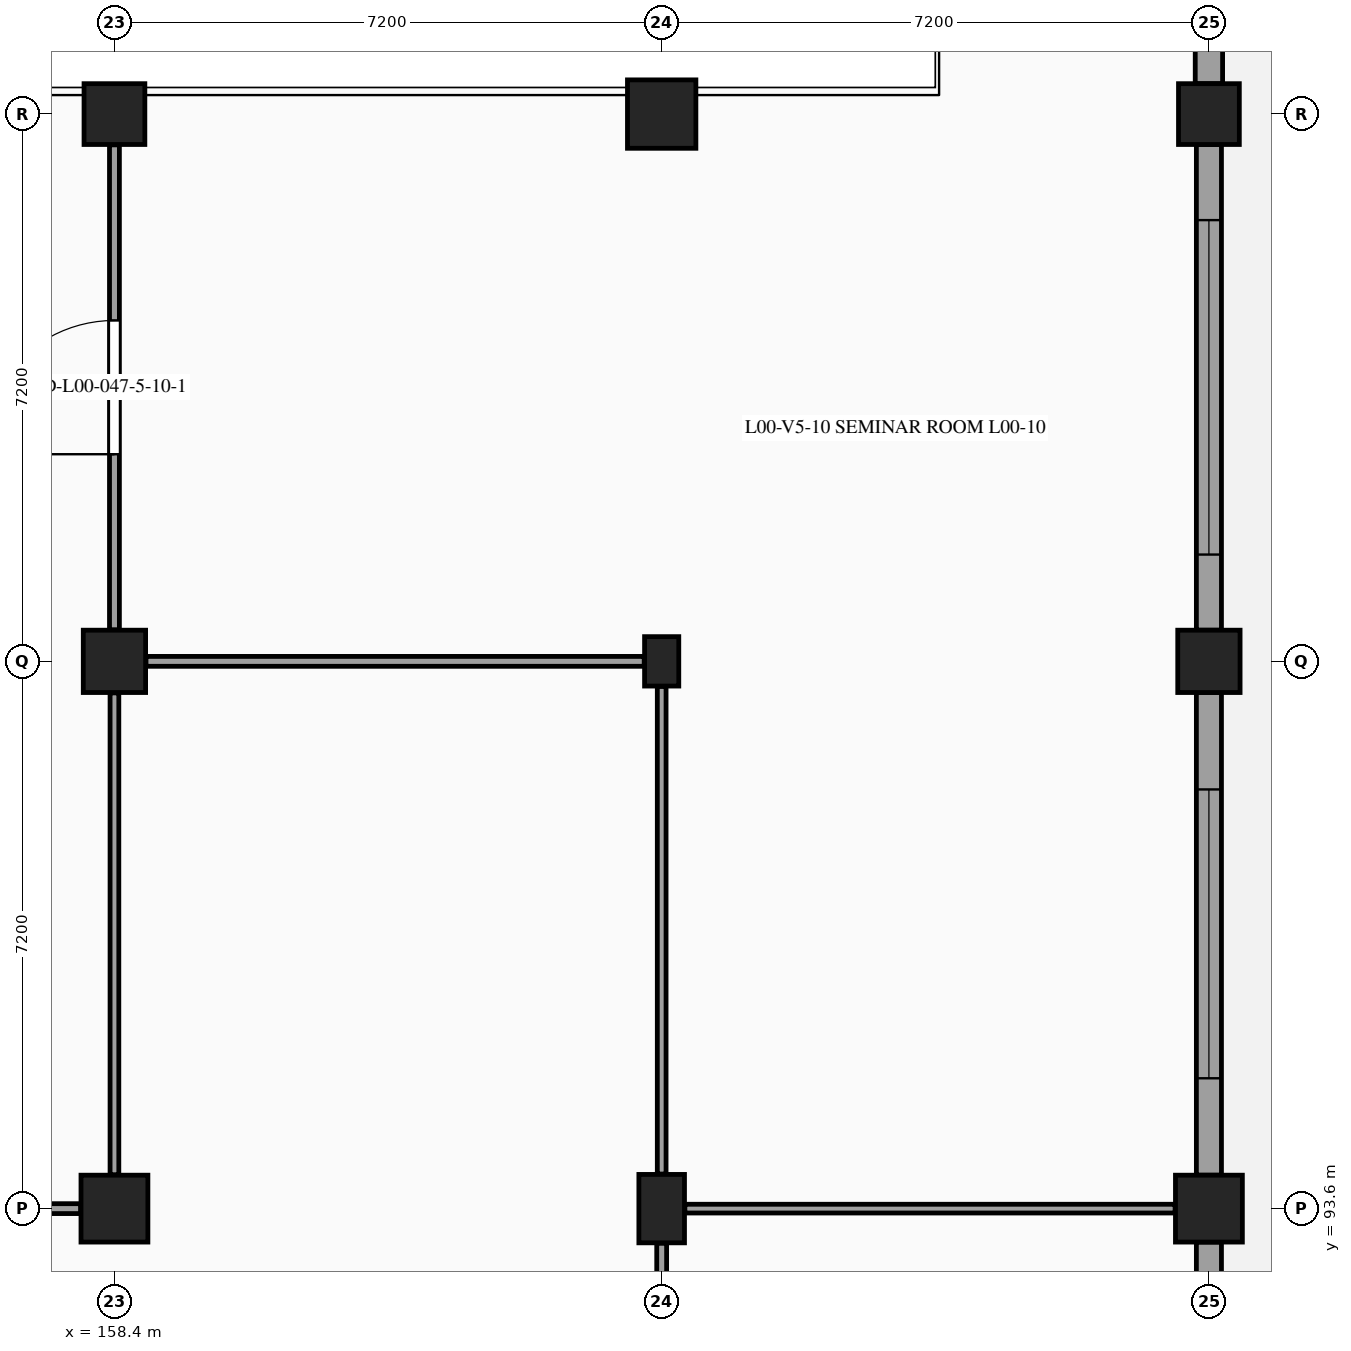
"""IFC4 building model, lengths in metres.
Left out: names, types, materials, properties, quantities, classifications, styles, units other than length and angle.
Written with IfcOpenShell. Run it as: python <this file> out.ifc"""

import sys

from ifc_helpers import new_model, si_unit, direction, frame, frame_2d, origin, origin_2d, place, context, subcontext, project, spatial, rectangle, extrude, element, fill, save


model = new_model("IFC4")
c1 = context("Model", 3, precision=1e-05, world=origin(), true_north=direction((0.0, 1.0)))
c2 = subcontext(c1, "Body", "Model", "MODEL_VIEW")
j1 = project(units=[si_unit("LENGTHUNIT", "METRE"), si_unit("PLANEANGLEUNIT", "RADIAN")], contexts=[c1])
p1 = place(None, origin())
s1 = spatial("IfcSite", under=j1, at=p1, CompositionType="ELEMENT")
p2 = place(p1, origin())
s2 = spatial("IfcBuilding", under=s1, at=p2, CompositionType="ELEMENT")
p3 = place(p2, origin())
s3 = spatial("IfcBuildingStorey", under=s2, at=p3, CompositionType="ELEMENT", Elevation=0.0)
p4 = place(p3, frame((158.4, 93.6, 0.0), z_axis=(0.0, 0.0, 1.0), x_axis=(1.0, 0.0, 0.0)))
e1 = element("IfcColumn", 1, at=p4, inside=s3, PredefinedType="COLUMN", context=c2, shape_type="SweptSolid", body=[
    extrude(rectangle(XDim=0.88, YDim=0.88, at=origin_2d()), origin(), (0.0, 0.0, 1.0), 5.4),
])
p5 = place(p3, frame((158.4, 100.8, 0.0), z_axis=(0.0, 0.0, 1.0), x_axis=(1.0, 0.0, 0.0)))
e2 = element("IfcColumn", 2, at=p5, inside=s3, PredefinedType="COLUMN", context=c2, shape_type="SweptSolid", body=[
    extrude(rectangle(XDim=0.82, YDim=0.82, at=origin_2d()), origin(), (0.0, 0.0, 1.0), 5.4),
])
p6 = place(p3, frame((158.4, 108.0, 0.0), z_axis=(0.0, 0.0, 1.0), x_axis=(1.0, 0.0, 0.0)))
e3 = element("IfcColumn", 3, at=p6, inside=s3, PredefinedType="COLUMN", context=c2, shape_type="SweptSolid", body=[
    extrude(rectangle(XDim=0.8, YDim=0.8, at=origin_2d()), origin(), (0.0, 0.0, 1.0), 5.4),
])
p7 = place(p3, frame((165.6, 93.6, 0.0), z_axis=(0.0, 0.0, 1.0), x_axis=(1.0, 0.0, 0.0)))
e4 = element("IfcColumn", 4, at=p7, inside=s3, PredefinedType="COLUMN", context=c2, shape_type="SweptSolid", body=[
    extrude(rectangle(XDim=0.6, YDim=0.9, at=origin_2d()), origin(), (0.0, 0.0, 1.0), 5.4),
])
p8 = place(p3, frame((165.6, 100.8, 0.0), z_axis=(0.0, 0.0, 1.0), x_axis=(1.0, 0.0, 0.0)))
e5 = element("IfcColumn", 5, at=p8, inside=s3, PredefinedType="PILASTER", context=c2, shape_type="SweptSolid", body=[
    extrude(rectangle(XDim=0.45, YDim=0.65, at=origin_2d()), origin(), (0.0, 0.0, 1.0), 5.4),
])
p9 = place(p3, frame((165.6, 108.0, 0.0), z_axis=(0.0, 0.0, 1.0), x_axis=(1.0, 0.0, 0.0)))
e6 = element("IfcColumn", 6, at=p9, inside=s3, PredefinedType="COLUMN", context=c2, shape_type="SweptSolid", body=[
    extrude(rectangle(XDim=0.9, YDim=0.9, at=origin_2d()), origin(), (0.0, 0.0, 1.0), 5.4),
])
p10 = place(p3, frame((172.8, 93.6, 0.0), z_axis=(0.0, 0.0, 1.0), x_axis=(1.0, 0.0, 0.0)))
e7 = element("IfcColumn", 7, at=p10, inside=s3, PredefinedType="COLUMN", context=c2, shape_type="SweptSolid", body=[
    extrude(rectangle(XDim=0.88, YDim=0.88, at=origin_2d()), origin(), (0.0, 0.0, 1.0), 5.4),
])
p11 = place(p3, frame((172.8, 100.8, 0.0), z_axis=(0.0, 0.0, 1.0), x_axis=(1.0, 0.0, 0.0)))
e8 = element("IfcColumn", 8, at=p11, inside=s3, PredefinedType="COLUMN", context=c2, shape_type="SweptSolid", body=[
    extrude(rectangle(XDim=0.82, YDim=0.82, at=origin_2d()), origin(), (0.0, 0.0, 1.0), 5.4),
])
p12 = place(p3, frame((172.8, 108.0, 0.0), z_axis=(0.0, 0.0, 1.0), x_axis=(1.0, 0.0, 0.0)))
e9 = element("IfcColumn", 9, at=p12, inside=s3, PredefinedType="COLUMN", context=c2, shape_type="SweptSolid", body=[
    extrude(rectangle(XDim=0.8, YDim=0.8, at=origin_2d()), origin(), (0.0, 0.0, 1.0), 5.4),
])
p13 = place(p3, frame((172.8, 114.75, 0.0), z_axis=(0.0, 0.0, 1.0), x_axis=(0.0, -1.0, 0.0)))
e10 = element("IfcWall", 10, at=p13, inside=s3, PredefinedType="STANDARD", context=c2, shape_type="SweptSolid", body=[
    extrude(rectangle(XDim=6.35, YDim=0.36, at=frame_2d((3.175, 0.0))), origin(), (0.0, 0.0, 1.0), 4.335),
])
p14 = place(p13, frame((0.1, 0.0, 0.0)))
e11 = element("IfcOpeningElement", 11, at=p14, cuts=e10, PredefinedType="OPENING", context=c2, shape_type="SweptSolid", body=[
    extrude(rectangle(XDim=3.2, YDim=3.2, at=frame_2d((1.6, 1.6))), frame((0.0, 0.19, 0.0), z_axis=(0.0, -1.0, 0.0), x_axis=(1.0, 0.0, 0.0)), (0.0, 0.0, 1.0), 0.38),
])
p15 = place(p3, frame((172.8, 107.6, 0.0), z_axis=(0.0, 0.0, 1.0), x_axis=(0.0, -1.0, 0.0)))
e12 = element("IfcWall", 12, at=p15, inside=s3, PredefinedType="STANDARD", context=c2, shape_type="SweptSolid", body=[
    extrude(rectangle(XDim=6.39, YDim=0.33, at=frame_2d((3.195, 0.0))), origin(), (0.0, 0.0, 1.0), 4.335),
])
p16 = place(p15, frame((0.995, 0.0, 0.98)))
e13 = element("IfcOpeningElement", 13, at=p16, cuts=e12, PredefinedType="OPENING", context=c2, shape_type="SweptSolid", body=[
    extrude(rectangle(XDim=4.4, YDim=1.65, at=frame_2d((2.2, 0.825))), frame((0.0, 0.175, 0.0), z_axis=(0.0, -1.0, 0.0), x_axis=(1.0, 0.0, 0.0)), (0.0, 0.0, 1.0), 0.35),
])
p17 = place(p3, frame((172.8, 100.39, 0.0), z_axis=(0.0, 0.0, 1.0), x_axis=(0.0, -1.0, 0.0)))
e14 = element("IfcWall", 14, at=p17, inside=s3, PredefinedType="STANDARD", context=c2, shape_type="SweptSolid", body=[
    extrude(rectangle(XDim=6.35, YDim=0.33, at=frame_2d((3.175, 0.0))), origin(), (0.0, 0.0, 1.0), 4.335),
])
p18 = place(p17, frame((1.275, 0.0, 0.98)))
e15 = element("IfcOpeningElement", 15, at=p18, cuts=e14, PredefinedType="OPENING", context=c2, shape_type="SweptSolid", body=[
    extrude(rectangle(XDim=3.8, YDim=1.6, at=frame_2d((1.9, 0.8))), frame((0.0, 0.175, 0.0), z_axis=(0.0, -1.0, 0.0), x_axis=(1.0, 0.0, 0.0)), (0.0, 0.0, 1.0), 0.35),
])
p19 = place(p3, frame((172.8, 93.16, 0.0), z_axis=(0.0, 0.0, 1.0), x_axis=(0.0, -1.0, 0.0)))
e16 = element("IfcWall", 16, at=p19, inside=s3, PredefinedType="STANDARD", context=c2, shape_type="SweptSolid", body=[
    extrude(rectangle(XDim=6.31, YDim=0.33, at=frame_2d((3.155, 0.0))), origin(), (0.0, 0.0, 1.0), 4.335),
])
p20 = place(p19, frame((1.705, 0.0, 0.98)))
e17 = element("IfcOpeningElement", 17, at=p20, cuts=e16, PredefinedType="OPENING", context=c2, shape_type="SweptSolid", body=[
    extrude(rectangle(XDim=2.9, YDim=1.6, at=frame_2d((1.45, 0.8))), frame((0.0, 0.175, 0.0), z_axis=(0.0, -1.0, 0.0), x_axis=(1.0, 0.0, 0.0)), (0.0, 0.0, 1.0), 0.35),
])
p21 = place(p3, frame((151.505, 93.6, 0.0), z_axis=(0.0, 0.0, 1.0), x_axis=(1.0, 0.0, 0.0)))
e18 = element("IfcWall", 18, at=p21, inside=s3, PredefinedType="PARTITIONING", context=c2, shape_type="SweptSolid", body=[
    extrude(rectangle(XDim=6.45, YDim=0.13, at=frame_2d((3.225, 0.0))), origin(), (0.0, 0.0, 1.0), 4.34),
])
p22 = place(p3, frame((158.4, 94.045, 0.0), z_axis=(0.0, 0.0, 1.0), x_axis=(0.0, 1.0, 0.0)))
e19 = element("IfcWall", 19, at=p22, inside=s3, PredefinedType="PARTITIONING", context=c2, shape_type="SweptSolid", body=[
    extrude(rectangle(XDim=6.34, YDim=0.115, at=frame_2d((3.17, 0.0))), origin(), (0.0, 0.0, 1.0), 4.46),
])
p23 = place(p3, frame((158.4, 101.215, 0.0), z_axis=(0.0, 0.0, 1.0), x_axis=(0.0, 1.0, 0.0)))
e20 = element("IfcWall", 20, at=p23, inside=s3, PredefinedType="PARTITIONING", context=c2, shape_type="SweptSolid", body=[
    extrude(rectangle(XDim=6.38, YDim=0.13, at=frame_2d((3.19, 0.0))), origin(), (0.0, 0.0, 1.0), 4.455),
])
p24 = place(p23, frame((2.31, 0.0, 0.0)))
e21 = element("IfcOpeningElement", 21, at=p24, cuts=e20, PredefinedType="OPENING", context=c2, shape_type="SweptSolid", body=[
    extrude(rectangle(XDim=1.76, YDim=2.3, at=frame_2d((0.88, 1.15))), frame((0.0, 0.075, 0.0), z_axis=(0.0, -1.0, 0.0), x_axis=(1.0, 0.0, 0.0)), (0.0, 0.0, 1.0), 0.15),
])
p25 = place(p3, frame((165.6, 86.805, 0.0), z_axis=(0.0, 0.0, 1.0), x_axis=(0.0, 1.0, 0.0)))
e22 = element("IfcWall", 22, at=p25, inside=s3, PredefinedType="PARTITIONING", context=c2, shape_type="SweptSolid", body=[
    extrude(rectangle(XDim=6.34, YDim=0.13, at=frame_2d((3.17, 0.0))), origin(), (0.0, 0.0, 1.0), 4.395),
])
p26 = place(p3, frame((165.6, 94.055, 0.0), z_axis=(0.0, 0.0, 1.0), x_axis=(0.0, 1.0, 0.0)))
e23 = element("IfcWall", 23, at=p26, inside=s3, PredefinedType="PARTITIONING", context=c2, shape_type="SweptSolid", body=[
    extrude(rectangle(XDim=6.415, YDim=0.115, at=frame_2d((3.208, 0.0))), origin(), (0.0, 0.0, 1.0), 4.46),
])
p27 = place(p3, frame((158.815, 100.8, 0.0), z_axis=(0.0, 0.0, 1.0), x_axis=(1.0, 0.0, 0.0)))
e24 = element("IfcWall", 24, at=p27, inside=s3, PredefinedType="PARTITIONING", context=c2, shape_type="SweptSolid", body=[
    extrude(rectangle(XDim=6.555, YDim=0.13, at=frame_2d((3.278, 0.0))), origin(), (0.0, 0.0, 1.0), 4.35),
])
p28 = place(p3, frame((165.905, 93.6, 0.0), z_axis=(0.0, 0.0, 1.0), x_axis=(1.0, 0.0, 0.0)))
e25 = element("IfcWall", 25, at=p28, inside=s3, PredefinedType="PARTITIONING", context=c2, shape_type="SweptSolid", body=[
    extrude(rectangle(XDim=6.45, YDim=0.115, at=frame_2d((3.225, 0.0))), origin(), (0.0, 0.0, 1.0), 4.365),
])
p29 = place(p16, origin())
e26 = element("IfcWindow", 26, at=p29, inside=s3, PartitioningType="SINGLE_PANEL", PredefinedType="WINDOW", context=c2, shape_type="SweptSolid", body=[
    extrude(rectangle(XDim=4.4, YDim=1.65, at=frame_2d((2.2, 0.825))), frame((0.0, -0.03, 0.0), z_axis=(0.0, -1.0, 0.0), x_axis=(1.0, 0.0, 0.0)), (0.0, 0.0, 1.0), 0.06),
])
fill(e13, e26)
p30 = place(p18, origin())
e27 = element("IfcWindow", 27, at=p30, inside=s3, PartitioningType="SINGLE_PANEL", PredefinedType="WINDOW", context=c2, shape_type="SweptSolid", body=[
    extrude(rectangle(XDim=3.8, YDim=1.6, at=frame_2d((1.9, 0.8))), frame((0.0, -0.03, 0.0), z_axis=(0.0, -1.0, 0.0), x_axis=(1.0, 0.0, 0.0)), (0.0, 0.0, 1.0), 0.06),
])
fill(e15, e27)
p31 = place(p24, origin())
e28 = element("IfcDoor", 28, at=p31, inside=s3, OperationType="SINGLE_SWING_LEFT", PredefinedType="DOOR", context=c2, shape_type="SweptSolid", body=[
    extrude(rectangle(XDim=1.76, YDim=2.3, at=frame_2d((0.88, 1.15))), frame((0.0, 0.025, 0.0), z_axis=(0.0, -1.0, 0.0), x_axis=(1.0, 0.0, 0.0)), (0.0, 0.0, 1.0), 0.05),
])
fill(e21, e28)
save(model, sys.argv[1])
